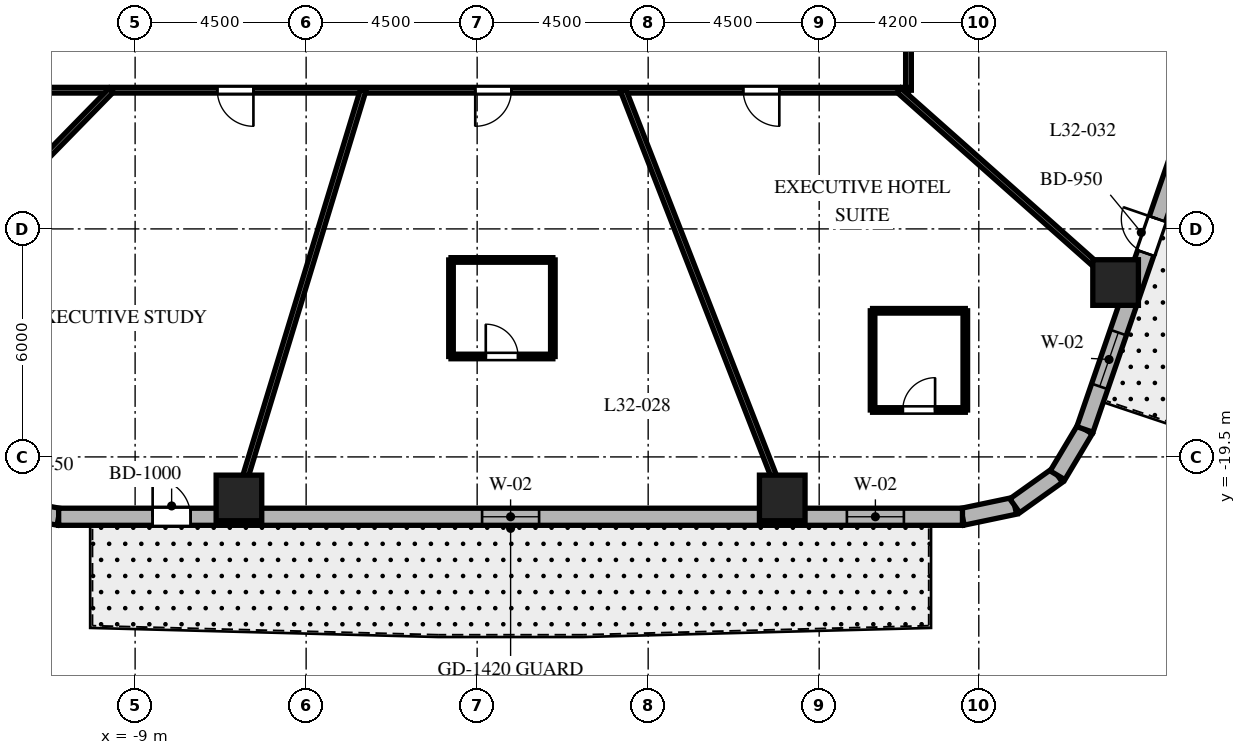
"""IFC4 building model, lengths in metres.
Left out: names, types, materials, properties, quantities, classifications, styles, units other than length and angle.
Written with IfcOpenShell. Run it as: python <this file> out.ifc"""

import sys

from ifc_helpers import new_model, si_unit, direction, frame, frame_2d, origin, origin_2d, place, context, subcontext, project, spatial, rectangle, extrude, element, fill, save


model = new_model("IFC4")
c1 = context("Model", 3, precision=1e-05, world=origin(), true_north=direction((0.0, 1.0)))
c2 = subcontext(c1, "Body", "Model", "MODEL_VIEW")
j1 = project(units=[si_unit("LENGTHUNIT", "METRE"), si_unit("PLANEANGLEUNIT", "RADIAN")], contexts=[c1])
p1 = place(None, origin())
s1 = spatial("IfcSite", under=j1, at=p1, CompositionType="ELEMENT")
p2 = place(p1, origin())
s2 = spatial("IfcBuilding", under=s1, at=p2, CompositionType="ELEMENT")
p3 = place(p2, frame((0.0, 0.0, 132.1)))
s3 = spatial("IfcBuildingStorey", under=s2, at=p3, CompositionType="ELEMENT", Elevation=132.1)
for number, where, z_axis, x_axis in (
    (1, (-6.268, -20.58, 0.0), (0.0, 0.0, 1.0), (1.0, 0.0, 0.0)),
    (2, (8.028, -20.58, 0.0), (0.0, 0.0, 1.0), (1.0, 0.0, 0.0)),
    (3, (16.8, -14.911, 0.0), (0.0, 0.0, 1.0), (1.0, 0.0, 0.0)),
):
    element("IfcColumn", number, at=place(p3, frame(where, z_axis=z_axis, x_axis=x_axis)), inside=s3, PredefinedType="COLUMN", context=c2, shape_type="SweptSolid", body=[
        extrude(rectangle(XDim=1.2, YDim=1.2, at=origin_2d()), origin(), (0.0, 0.0, 1.0), 3.7),
    ])
p4 = place(p3, frame((-12.259, -20.84, 0.0), z_axis=(0.0, 0.0, 1.0), x_axis=(0.982730354425, -0.185043374624, 0.0)))
e4 = element("IfcWall", 4, at=p4, inside=s3, PredefinedType="SOLIDWALL", context=c2, shape_type="SweptSolid", body=[
    extrude(rectangle(XDim=1.269, YDim=0.45, at=frame_2d((0.635, 0.0))), origin(), (0.0, 0.0, 1.0), 3.4),
])
p5 = place(p3, frame((12.771, -21.075, 0.0), z_axis=(0.0, 0.0, 1.0), x_axis=(0.97874281988, 0.205091424819, 0.0)))
e5 = element("IfcWall", 5, at=p5, inside=s3, PredefinedType="SOLIDWALL", context=c2, shape_type="SweptSolid", body=[
    extrude(rectangle(XDim=1.406, YDim=0.45, at=frame_2d((0.703, 0.0))), origin(), (0.0, 0.0, 1.0), 3.4),
])
p6 = place(p3, frame((14.146, -20.787, 0.0), z_axis=(0.0, 0.0, 1.0), x_axis=(0.814162929117, 0.580636482536, 0.0)))
e6 = element("IfcWall", 6, at=p6, inside=s3, PredefinedType="SOLIDWALL", context=c2, shape_type="SweptSolid", body=[
    extrude(rectangle(XDim=1.382, YDim=0.45, at=frame_2d((0.691, 0.0))), origin(), (0.0, 0.0, 1.0), 3.4),
])
p7 = place(p3, frame((15.272, -19.984, 0.0), z_axis=(0.0, 0.0, 1.0), x_axis=(0.512579347361, 0.858639862025, 0.0)))
e7 = element("IfcWall", 7, at=p7, inside=s3, PredefinedType="SOLIDWALL", context=c2, shape_type="SweptSolid", body=[
    extrude(rectangle(XDim=1.406, YDim=0.45, at=frame_2d((0.703, 0.0))), origin(), (0.0, 0.0, 1.0), 3.4),
])
p8 = place(p3, frame((-11.012, -21.075, 0.0), z_axis=(0.0, 0.0, 1.0), x_axis=(1.0, 0.0, 0.0)))
e8 = element("IfcWall", 8, at=p8, inside=s3, PredefinedType="SOLIDWALL", context=c2, shape_type="SweptSolid", body=[
    extrude(rectangle(XDim=23.782, YDim=0.45, at=frame_2d((11.891, 0.0))), origin(), (0.0, 0.0, 1.0), 3.4),
])
p9 = place(p8, frame((2.473, 0.0, 0.0)))
e9 = element("IfcOpeningElement", 9, at=p9, cuts=e8, PredefinedType="OPENING", context=c2, shape_type="SweptSolid", body=[
    extrude(rectangle(XDim=1.0, YDim=2.15, at=frame_2d((0.5, 1.075))), frame((0.0, 0.235, 0.0), z_axis=(0.0, -1.0, 0.0), x_axis=(1.0, 0.0, 0.0)), (0.0, 0.0, 1.0), 0.47),
])
p10 = place(p8, frame((11.142, 0.0, 0.8)))
e10 = element("IfcOpeningElement", 10, at=p10, cuts=e8, PredefinedType="OPENING", context=c2, shape_type="SweptSolid", body=[
    extrude(rectangle(XDim=1.5, YDim=1.8, at=frame_2d((0.75, 0.9))), frame((0.0, 0.235, 0.0), z_axis=(0.0, -1.0, 0.0), x_axis=(1.0, 0.0, 0.0)), (0.0, 0.0, 1.0), 0.47),
])
p11 = place(p8, frame((20.741, 0.0, 0.8)))
e11 = element("IfcOpeningElement", 11, at=p11, cuts=e8, PredefinedType="OPENING", context=c2, shape_type="SweptSolid", body=[
    extrude(rectangle(XDim=1.5, YDim=1.8, at=frame_2d((0.75, 0.9))), frame((0.0, 0.235, 0.0), z_axis=(0.0, -1.0, 0.0), x_axis=(1.0, 0.0, 0.0)), (0.0, 0.0, 1.0), 0.47),
])
p12 = place(p3, frame((15.992, -18.777, 0.0), z_axis=(0.0, 0.0, 1.0), x_axis=(0.325606988926, 0.945505202927, 0.0)))
e12 = element("IfcWall", 12, at=p12, inside=s3, PredefinedType="SOLIDWALL", context=c2, shape_type="SweptSolid", body=[
    extrude(rectangle(XDim=19.669, YDim=0.45, at=frame_2d((9.835, 0.0))), origin(), (0.0, 0.0, 1.0), 3.4),
])
p13 = place(p12, frame((4.909, 0.0, 0.0)))
e13 = element("IfcOpeningElement", 13, at=p13, cuts=e12, PredefinedType="OPENING", context=c2, shape_type="SweptSolid", body=[
    extrude(rectangle(XDim=0.95, YDim=2.15, at=frame_2d((0.475, 1.075))), frame((0.0, 0.235, 0.0), z_axis=(0.0, -1.0, 0.0), x_axis=(1.0, 0.0, 0.0)), (0.0, 0.0, 1.0), 0.47),
])
p14 = place(p12, frame((1.197, 0.0, 0.8)))
e14 = element("IfcOpeningElement", 14, at=p14, cuts=e12, PredefinedType="OPENING", context=c2, shape_type="SweptSolid", body=[
    extrude(rectangle(XDim=1.5, YDim=1.8, at=frame_2d((0.75, 0.9))), frame((0.0, 0.235, 0.0), z_axis=(0.0, -1.0, 0.0), x_axis=(1.0, 0.0, 0.0)), (0.0, 0.0, 1.0), 0.47),
])
p15 = place(p12, frame((9.03, 0.0, 0.8)))
e15 = element("IfcOpeningElement", 15, at=p15, cuts=e12, PredefinedType="OPENING", context=c2, shape_type="SweptSolid", body=[
    extrude(rectangle(XDim=1.5, YDim=1.8, at=frame_2d((0.75, 0.9))), frame((0.0, 0.235, 0.0), z_axis=(0.0, -1.0, 0.0), x_axis=(1.0, 0.0, 0.0)), (0.0, 0.0, 1.0), 0.47),
])
p16 = place(p12, frame((16.918, 0.0, 0.8)))
e16 = element("IfcOpeningElement", 16, at=p16, cuts=e12, PredefinedType="OPENING", context=c2, shape_type="SweptSolid", body=[
    extrude(rectangle(XDim=1.5, YDim=1.8, at=frame_2d((0.75, 0.9))), frame((0.0, 0.235, 0.0), z_axis=(0.0, -1.0, 0.0), x_axis=(1.0, 0.0, 0.0)), (0.0, 0.0, 1.0), 0.47),
])
p17 = place(p3, frame((11.35, 9.85, 0.0), z_axis=(0.0, 0.0, 1.0), x_axis=(0.0, -1.0, 0.0)))
e17 = element("IfcWall", 17, at=p17, inside=s3, PredefinedType="PARTITIONING", context=c2, shape_type="SweptSolid", body=[
    extrude(rectangle(XDim=19.7, YDim=0.15, at=frame_2d((9.85, 0.0))), origin(), (0.0, 0.0, 1.0), 2.84),
])
p18 = place(p17, frame((3.008, 0.0, 0.0)))
e18 = element("IfcOpeningElement", 18, at=p18, cuts=e17, PredefinedType="OPENING", context=c2, shape_type="SweptSolid", body=[
    extrude(rectangle(XDim=0.95, YDim=2.03, at=frame_2d((0.475, 1.015))), frame((0.0, 0.085, 0.0), z_axis=(0.0, -1.0, 0.0), x_axis=(1.0, 0.0, 0.0)), (0.0, 0.0, 1.0), 0.17),
])
p19 = place(p17, frame((15.205, 0.0, 0.0)))
e19 = element("IfcOpeningElement", 19, at=p19, cuts=e17, PredefinedType="OPENING", context=c2, shape_type="SweptSolid", body=[
    extrude(rectangle(XDim=0.95, YDim=2.03, at=frame_2d((0.475, 1.015))), frame((0.0, 0.085, 0.0), z_axis=(0.0, -1.0, 0.0), x_axis=(1.0, 0.0, 0.0)), (0.0, 0.0, 1.0), 0.17),
])
p20 = place(p17, frame((8.836, 0.0, 0.0)))
e20 = element("IfcOpeningElement", 20, at=p20, cuts=e17, PredefinedType="OPENING", context=c2, shape_type="SweptSolid", body=[
    extrude(rectangle(XDim=0.95, YDim=2.03, at=frame_2d((0.475, 1.015))), frame((0.0, 0.085, 0.0), z_axis=(0.0, -1.0, 0.0), x_axis=(1.0, 0.0, 0.0)), (0.0, 0.0, 1.0), 0.17),
])
p21 = place(p3, frame((11.35, -9.85, 0.0), z_axis=(0.0, 0.0, 1.0), x_axis=(-1.0, 0.0, 0.0)))
e21 = element("IfcWall", 21, at=p21, inside=s3, PredefinedType="PARTITIONING", context=c2, shape_type="SweptSolid", body=[
    extrude(rectangle(XDim=22.7, YDim=0.15, at=frame_2d((11.35, 0.0))), origin(), (0.0, 0.0, 1.0), 2.84),
])
p22 = place(p21, frame((17.237, 0.0, 0.0)))
e22 = element("IfcOpeningElement", 22, at=p22, cuts=e21, PredefinedType="OPENING", context=c2, shape_type="SweptSolid", body=[
    extrude(rectangle(XDim=0.95, YDim=2.03, at=frame_2d((0.475, 1.015))), frame((0.0, 0.085, 0.0), z_axis=(0.0, -1.0, 0.0), x_axis=(1.0, 0.0, 0.0)), (0.0, 0.0, 1.0), 0.17),
])
p23 = place(p21, frame((10.45, 0.0, 0.0)))
e23 = element("IfcOpeningElement", 23, at=p23, cuts=e21, PredefinedType="OPENING", context=c2, shape_type="SweptSolid", body=[
    extrude(rectangle(XDim=0.95, YDim=2.03, at=frame_2d((0.475, 1.015))), frame((0.0, 0.085, 0.0), z_axis=(0.0, -1.0, 0.0), x_axis=(1.0, 0.0, 0.0)), (0.0, 0.0, 1.0), 0.17),
])
p24 = place(p21, frame((3.399, 0.0, 0.0)))
e24 = element("IfcOpeningElement", 24, at=p24, cuts=e21, PredefinedType="OPENING", context=c2, shape_type="SweptSolid", body=[
    extrude(rectangle(XDim=0.95, YDim=2.03, at=frame_2d((0.475, 1.015))), frame((0.0, 0.085, 0.0), z_axis=(0.0, -1.0, 0.0), x_axis=(1.0, 0.0, 0.0)), (0.0, 0.0, 1.0), 0.17),
])
p25 = place(p3, frame((-9.628, -9.85, 0.0), z_axis=(0.0, 0.0, 1.0), x_axis=(-0.698992824326, -0.715128681805, 0.0)))
e25 = element("IfcWall", 25, at=p25, inside=s3, PredefinedType="PARTITIONING", context=c2, shape_type="SweptSolid", body=[
    extrude(rectangle(XDim=8.579, YDim=0.15, at=frame_2d((4.29, 0.0))), origin(), (0.0, 0.0, 1.0), 2.54),
])
p26 = place(p3, frame((-3.0, -9.85, 0.0), z_axis=(0.0, 0.0, 1.0), x_axis=(-0.291352035382, -0.95661590593, 0.0)))
e26 = element("IfcWall", 26, at=p26, inside=s3, PredefinedType="PARTITIONING", context=c2, shape_type="SweptSolid", body=[
    extrude(rectangle(XDim=11.734, YDim=0.15, at=frame_2d((5.867, 0.0))), origin(), (0.0, 0.0, 1.0), 2.54),
])
p27 = place(p3, frame((3.842, -9.85, 0.0), z_axis=(0.0, 0.0, 1.0), x_axis=(0.363432685593, -0.931620460833, 0.0)))
e27 = element("IfcWall", 27, at=p27, inside=s3, PredefinedType="PARTITIONING", context=c2, shape_type="SweptSolid", body=[
    extrude(rectangle(XDim=12.049, YDim=0.15, at=frame_2d((6.024, 0.0))), origin(), (0.0, 0.0, 1.0), 2.54),
])
p28 = place(p3, frame((11.098, -9.85, 0.0), z_axis=(0.0, 0.0, 1.0), x_axis=(0.747904295103, -0.663806572253, 0.0)))
e28 = element("IfcWall", 28, at=p28, inside=s3, PredefinedType="PARTITIONING", context=c2, shape_type="SweptSolid", body=[
    extrude(rectangle(XDim=8.16, YDim=0.15, at=frame_2d((4.08, 0.0))), origin(), (0.0, 0.0, 1.0), 2.54),
])
p29 = place(p3, frame((-0.688, -16.857, 0.0), z_axis=(0.0, 0.0, 1.0), x_axis=(1.0, 0.0, 0.0)))
e29 = element("IfcWall", 29, at=p29, inside=s3, PredefinedType="PARTITIONING", context=c2, shape_type="SweptSolid", body=[
    extrude(rectangle(XDim=2.68, YDim=0.12, at=frame_2d((1.34, 0.0))), origin(), (0.0, 0.0, 1.0), 3.4),
])
p30 = place(p29, frame((0.915, 0.0, 0.0)))
e30 = element("IfcOpeningElement", 30, at=p30, cuts=e29, PredefinedType="OPENING", context=c2, shape_type="SweptSolid", body=[
    extrude(rectangle(XDim=0.85, YDim=2.03, at=frame_2d((0.425, 1.015))), frame((0.0, 0.07, 0.0), z_axis=(0.0, -1.0, 0.0), x_axis=(1.0, 0.0, 0.0)), (0.0, 0.0, 1.0), 0.14),
])
p31 = place(p3, frame((1.992, -16.857, 0.0), z_axis=(0.0, 0.0, 1.0), x_axis=(0.0, 1.0, 0.0)))
e31 = element("IfcWall", 31, at=p31, inside=s3, PredefinedType="PARTITIONING", context=c2, shape_type="SweptSolid", body=[
    extrude(rectangle(XDim=2.54, YDim=0.12, at=frame_2d((1.27, 0.0))), origin(), (0.0, 0.0, 1.0), 2.84),
])
p32 = place(p3, frame((1.992, -14.317, 0.0), z_axis=(0.0, 0.0, 1.0), x_axis=(-1.0, 0.0, 0.0)))
e32 = element("IfcWall", 32, at=p32, inside=s3, PredefinedType="PARTITIONING", context=c2, shape_type="SweptSolid", body=[
    extrude(rectangle(XDim=2.68, YDim=0.12, at=frame_2d((1.34, 0.0))), origin(), (0.0, 0.0, 1.0), 3.4),
])
p33 = place(p3, frame((-0.688, -14.317, 0.0), z_axis=(0.0, 0.0, 1.0), x_axis=(0.0, -1.0, 0.0)))
e33 = element("IfcWall", 33, at=p33, inside=s3, PredefinedType="PARTITIONING", context=c2, shape_type="SweptSolid", body=[
    extrude(rectangle(XDim=2.54, YDim=0.12, at=frame_2d((1.27, 0.0))), origin(), (0.0, 0.0, 1.0), 2.84),
])
p34 = place(p3, frame((10.405, -18.265, 0.0), z_axis=(0.0, 0.0, 1.0), x_axis=(1.0, 0.0, 0.0)))
e34 = element("IfcWall", 34, at=p34, inside=s3, PredefinedType="PARTITIONING", context=c2, shape_type="SweptSolid", body=[
    extrude(rectangle(XDim=2.44, YDim=0.12, at=frame_2d((1.22, 0.0))), origin(), (0.0, 0.0, 1.0), 2.54),
])
p35 = place(p34, frame((0.795, 0.0, 0.0)))
e35 = element("IfcOpeningElement", 35, at=p35, cuts=e34, PredefinedType="OPENING", context=c2, shape_type="SweptSolid", body=[
    extrude(rectangle(XDim=0.85, YDim=2.03, at=frame_2d((0.425, 1.015))), frame((0.0, 0.07, 0.0), z_axis=(0.0, -1.0, 0.0), x_axis=(1.0, 0.0, 0.0)), (0.0, 0.0, 1.0), 0.14),
])
p36 = place(p3, frame((12.845, -18.265, 0.0), z_axis=(0.0, 0.0, 1.0), x_axis=(0.0, 1.0, 0.0)))
e36 = element("IfcWall", 36, at=p36, inside=s3, PredefinedType="PARTITIONING", context=c2, shape_type="SweptSolid", body=[
    extrude(rectangle(XDim=2.61, YDim=0.12, at=frame_2d((1.305, 0.0))), origin(), (0.0, 0.0, 1.0), 2.54),
])
p37 = place(p3, frame((12.845, -15.655, 0.0), z_axis=(0.0, 0.0, 1.0), x_axis=(-1.0, 0.0, 0.0)))
e37 = element("IfcWall", 37, at=p37, inside=s3, PredefinedType="PARTITIONING", context=c2, shape_type="SweptSolid", body=[
    extrude(rectangle(XDim=2.44, YDim=0.12, at=frame_2d((1.22, 0.0))), origin(), (0.0, 0.0, 1.0), 3.4),
])
p38 = place(p3, frame((10.405, -15.655, 0.0), z_axis=(0.0, 0.0, 1.0), x_axis=(0.0, -1.0, 0.0)))
e38 = element("IfcWall", 38, at=p38, inside=s3, PredefinedType="PARTITIONING", context=c2, shape_type="SweptSolid", body=[
    extrude(rectangle(XDim=2.61, YDim=0.12, at=frame_2d((1.305, 0.0))), origin(), (0.0, 0.0, 1.0), 3.4),
])
p39 = place(p9, origin())
e39 = element("IfcDoor", 39, at=p39, inside=s3, OperationType="SINGLE_SWING_LEFT", PredefinedType="DOOR", context=c2, shape_type="SweptSolid", body=[
    extrude(rectangle(XDim=1.0, YDim=2.15, at=frame_2d((0.5, 1.075))), frame((0.0, 0.025, 0.0), z_axis=(0.0, -1.0, 0.0), x_axis=(1.0, 0.0, 0.0)), (0.0, 0.0, 1.0), 0.05),
])
fill(e9, e39)
p40 = place(p10, origin())
e40 = element("IfcWindow", 40, at=p40, inside=s3, PartitioningType="SINGLE_PANEL", PredefinedType="WINDOW", context=c2, shape_type="SweptSolid", body=[
    extrude(rectangle(XDim=1.5, YDim=1.8, at=frame_2d((0.75, 0.9))), frame((0.0, 0.03, 0.0), z_axis=(0.0, -1.0, 0.0), x_axis=(1.0, 0.0, 0.0)), (0.0, 0.0, 1.0), 0.06),
])
fill(e10, e40)
p41 = place(p11, origin())
e41 = element("IfcWindow", 41, at=p41, inside=s3, PartitioningType="SINGLE_PANEL", PredefinedType="WINDOW", context=c2, shape_type="SweptSolid", body=[
    extrude(rectangle(XDim=1.5, YDim=1.8, at=frame_2d((0.75, 0.9))), frame((0.0, 0.03, 0.0), z_axis=(0.0, -1.0, 0.0), x_axis=(1.0, 0.0, 0.0)), (0.0, 0.0, 1.0), 0.06),
])
fill(e11, e41)
p42 = place(p13, origin())
e42 = element("IfcDoor", 42, at=p42, inside=s3, OperationType="SINGLE_SWING_RIGHT", PredefinedType="DOOR", context=c2, shape_type="SweptSolid", body=[
    extrude(rectangle(XDim=0.95, YDim=2.15, at=frame_2d((0.475, 1.075))), frame((0.0, 0.025, 0.0), z_axis=(0.0, -1.0, 0.0), x_axis=(1.0, 0.0, 0.0)), (0.0, 0.0, 1.0), 0.05),
])
fill(e13, e42)
p43 = place(p14, origin())
e43 = element("IfcWindow", 43, at=p43, inside=s3, PartitioningType="SINGLE_PANEL", PredefinedType="WINDOW", context=c2, shape_type="SweptSolid", body=[
    extrude(rectangle(XDim=1.5, YDim=1.8, at=frame_2d((0.75, 0.9))), frame((0.0, 0.03, 0.0), z_axis=(0.0, -1.0, 0.0), x_axis=(1.0, 0.0, 0.0)), (0.0, 0.0, 1.0), 0.06),
])
fill(e14, e43)
p44 = place(p22, origin())
e44 = element("IfcDoor", 44, at=p44, inside=s3, OperationType="SINGLE_SWING_LEFT", PredefinedType="DOOR", context=c2, shape_type="SweptSolid", body=[
    extrude(rectangle(XDim=0.95, YDim=2.03, at=frame_2d((0.475, 1.015))), frame((0.0, 0.025, 0.0), z_axis=(0.0, -1.0, 0.0), x_axis=(1.0, 0.0, 0.0)), (0.0, 0.0, 1.0), 0.05),
])
fill(e22, e44)
p45 = place(p23, origin())
e45 = element("IfcDoor", 45, at=p45, inside=s3, OperationType="SINGLE_SWING_RIGHT", PredefinedType="DOOR", context=c2, shape_type="SweptSolid", body=[
    extrude(rectangle(XDim=0.95, YDim=2.03, at=frame_2d((0.475, 1.015))), frame((0.0, 0.025, 0.0), z_axis=(0.0, -1.0, 0.0), x_axis=(1.0, 0.0, 0.0)), (0.0, 0.0, 1.0), 0.05),
])
fill(e23, e45)
p46 = place(p30, origin())
e46 = element("IfcDoor", 46, at=p46, inside=s3, OperationType="SINGLE_SWING_LEFT", PredefinedType="DOOR", context=c2, shape_type="SweptSolid", body=[
    extrude(rectangle(XDim=0.85, YDim=2.03, at=frame_2d((0.425, 1.015))), frame((0.0, 0.025, 0.0), z_axis=(0.0, -1.0, 0.0), x_axis=(1.0, 0.0, 0.0)), (0.0, 0.0, 1.0), 0.05),
])
fill(e30, e46)
p47 = place(p24, origin())
e47 = element("IfcDoor", 47, at=p47, inside=s3, OperationType="SINGLE_SWING_LEFT", PredefinedType="DOOR", context=c2, shape_type="SweptSolid", body=[
    extrude(rectangle(XDim=0.95, YDim=2.03, at=frame_2d((0.475, 1.015))), frame((0.0, 0.025, 0.0), z_axis=(0.0, -1.0, 0.0), x_axis=(1.0, 0.0, 0.0)), (0.0, 0.0, 1.0), 0.05),
])
fill(e24, e47)
p48 = place(p35, origin())
e48 = element("IfcDoor", 48, at=p48, inside=s3, OperationType="SINGLE_SWING_RIGHT", PredefinedType="DOOR", context=c2, shape_type="SweptSolid", body=[
    extrude(rectangle(XDim=0.85, YDim=2.03, at=frame_2d((0.425, 1.015))), frame((0.0, 0.025, 0.0), z_axis=(0.0, -1.0, 0.0), x_axis=(1.0, 0.0, 0.0)), (0.0, 0.0, 1.0), 0.05),
])
fill(e35, e48)
save(model, sys.argv[1])
